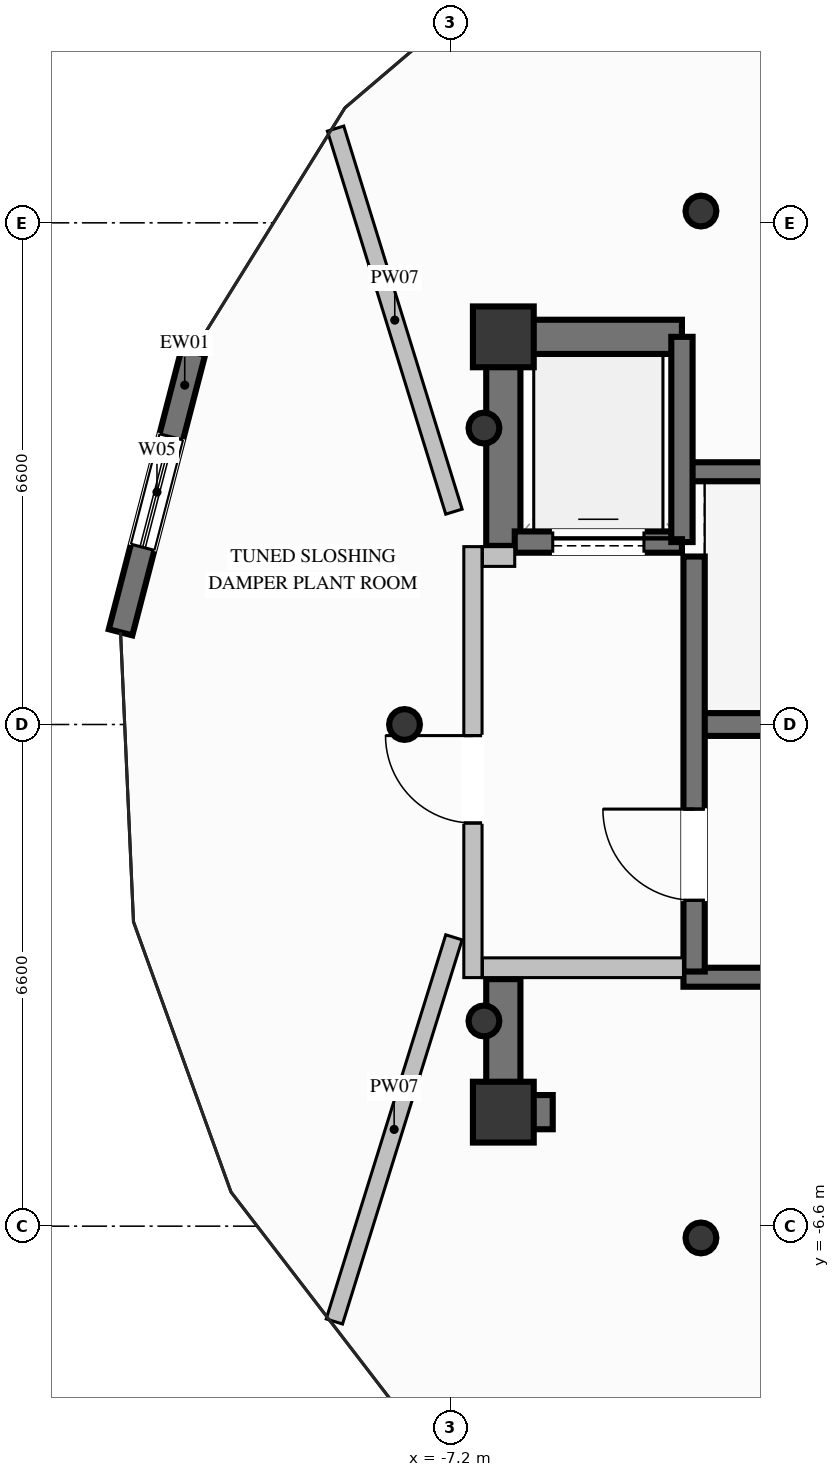
"""IFC4 building model, lengths in metres.
Left out: names, types, materials, properties, quantities, classifications, styles, units other than length and angle.
Written with IfcOpenShell. Run it as: python <this file> out.ifc"""

import sys

from ifc_helpers import new_model, si_unit, direction, frame, frame_2d, origin, origin_2d, place, context, subcontext, project, spatial, rectangle, hollow_circle, extrude, element, fill, save


model = new_model("IFC4")
c1 = context("Model", 3, precision=1e-05, world=origin(), true_north=direction((0.0, 1.0)))
c2 = subcontext(c1, "Body", "Model", "MODEL_VIEW")
j1 = project(units=[si_unit("LENGTHUNIT", "METRE"), si_unit("PLANEANGLEUNIT", "RADIAN")], contexts=[c1])
p1 = place(None, origin())
s1 = spatial("IfcSite", under=j1, at=p1, CompositionType="ELEMENT")
p2 = place(p1, origin())
s2 = spatial("IfcBuilding", under=s1, at=p2, CompositionType="ELEMENT")
p3 = place(p2, frame((0.0, 0.0, 314.6)))
s3 = spatial("IfcBuildingStorey", under=s2, at=p3, CompositionType="ELEMENT", Elevation=314.6)
for number, where, z_axis, x_axis in (
    (1, (-6.5, -5.1, 0.0), (0.0, 0.0, 1.0), (1.0, 0.0, 0.0)),
    (2, (-6.5, 5.1, 0.0), (0.0, 0.0, 1.0), (1.0, 0.0, 0.0)),
):
    element("IfcColumn", number, at=place(p3, frame(where, z_axis=z_axis, x_axis=x_axis)), inside=s3, PredefinedType="COLUMN", context=c2, shape_type="SweptSolid", body=[
        extrude(rectangle(XDim=0.8, YDim=0.8, at=origin_2d()), origin(), (0.0, 0.0, 1.0), 6.4),
    ])
p4 = place(p3, frame((-3.99, 0.0, 0.0), z_axis=(0.0, 0.0, 1.0), x_axis=(1.0, 0.0, 0.0)))
e3 = element("IfcWall", 3, at=p4, inside=s3, PredefinedType="SHEAR", context=c2, shape_type="SweptSolid", body=[
    extrude(rectangle(XDim=7.98, YDim=0.3, at=frame_2d((3.99, 0.0))), origin(), (0.0, 0.0, 1.0), 6.4),
])
for number, where, z_axis, x_axis in (
    (4, (-4.13, -3.325, 0.0), (0.0, 0.0, 1.0), (1.0, 0.0, 0.0)),
    (5, (-4.13, 3.325, 0.0), (0.0, 0.0, 1.0), (1.0, 0.0, 0.0)),
):
    element("IfcWall", number, at=place(p3, frame(where, z_axis=z_axis, x_axis=x_axis)), inside=s3, PredefinedType="SOLIDWALL", context=c2, shape_type="SweptSolid", body=[
        extrude(rectangle(XDim=8.26, YDim=0.25, at=frame_2d((4.13, 0.0))), origin(), (0.0, 0.0, 1.0), 6.4),
    ])
p5 = place(p3, frame((-6.275, -5.1, 0.0), z_axis=(0.0, 0.0, 1.0), x_axis=(1.0, 0.0, 0.0)))
e6 = element("IfcWall", 6, at=p5, inside=s3, PredefinedType="SHEAR", context=c2, shape_type="SweptSolid", body=[
    extrude(rectangle(XDim=0.425, YDim=0.45, at=frame_2d((0.212, 0.0))), origin(), (0.0, 0.0, 1.0), 6.4),
])
p6 = place(p3, frame((-6.275, 5.1, 0.0), z_axis=(0.0, 0.0, 1.0), x_axis=(1.0, 0.0, 0.0)))
e7 = element("IfcWall", 7, at=p6, inside=s3, PredefinedType="SHEAR", context=c2, shape_type="SweptSolid", body=[
    extrude(rectangle(XDim=2.125, YDim=0.45, at=frame_2d((1.062, 0.0))), origin(), (0.0, 0.0, 1.0), 6.4),
])
p7 = place(p3, frame((-6.5, 2.35, 0.0), z_axis=(0.0, 0.0, 1.0), x_axis=(0.0, 1.0, 0.0)))
e8 = element("IfcWall", 8, at=p7, inside=s3, PredefinedType="SHEAR", context=c2, shape_type="SweptSolid", body=[
    extrude(rectangle(XDim=2.975, YDim=0.45, at=frame_2d((1.487, 0.0))), origin(), (0.0, 0.0, 1.0), 6.4),
])
p8 = place(p3, frame((-6.5, -5.325, 0.0), z_axis=(0.0, 0.0, 1.0), x_axis=(0.0, 1.0, 0.0)))
e9 = element("IfcWall", 9, at=p8, inside=s3, PredefinedType="SHEAR", context=c2, shape_type="SweptSolid", body=[
    extrude(rectangle(XDim=1.975, YDim=0.45, at=frame_2d((0.987, 0.0))), origin(), (0.0, 0.0, 1.0), 6.4),
])
for number, where, z_axis, x_axis in (
    (10, (-3.9, 6.755, 0.0), (0.0, 0.0, 1.0), (1.0, 0.0, 0.0)),
    (11, (-6.755, 3.9, 0.0), (0.0, 0.0, 1.0), (1.0, 0.0, 0.0)),
    (12, (-7.8, 0.0, 0.0), (0.0, 0.0, 1.0), (1.0, 0.0, 0.0)),
    (13, (-6.755, -3.9, 0.0), (0.0, 0.0, 1.0), (1.0, 0.0, 0.0)),
    (14, (-3.9, -6.755, 0.0), (0.0, 0.0, 1.0), (1.0, 0.0, 0.0)),
):
    element("IfcColumn", number, at=place(p3, frame(where, z_axis=z_axis, x_axis=x_axis)), inside=s3, PredefinedType="COLUMN", context=c2, shape_type="SweptSolid", body=[
        extrude(hollow_circle(Radius=0.203, WallThickness=0.016, at=origin_2d()), origin(), (0.0, 0.0, 1.0), 6.4),
    ])
p9 = place(p3, frame((-11.536, 1.213, 0.0), z_axis=(0.0, 0.0, 1.0), x_axis=(0.2512799417, 0.967914454329, 0.0)))
e15 = element("IfcWall", 15, at=p9, inside=s3, PredefinedType="SOLIDWALL", context=c2, shape_type="SweptSolid", body=[
    extrude(rectangle(XDim=3.812, YDim=0.32, at=frame_2d((1.906, 0.0))), origin(), (0.0, 0.0, 1.0), 6.12),
])
p10 = place(p9, frame((1.156, 0.0, 1.1)))
e16 = element("IfcOpeningElement", 16, at=p10, cuts=e15, PredefinedType="OPENING", context=c2, shape_type="SweptSolid", body=[
    extrude(rectangle(XDim=1.5, YDim=1.2, at=frame_2d((0.75, 0.6))), frame((0.0, 0.17, 0.0), z_axis=(0.0, -1.0, 0.0), x_axis=(1.0, 0.0, 0.0)), (0.0, 0.0, 1.0), 0.34),
])
p11 = place(p3, frame((-6.35, 2.4, 0.0), z_axis=(0.0, 0.0, 1.0), x_axis=(1.0, 0.0, 0.0)))
e17 = element("IfcWall", 17, at=p11, inside=s3, PredefinedType="SOLIDWALL", context=c2, shape_type="SweptSolid", body=[
    extrude(rectangle(XDim=2.2, YDim=0.28, at=frame_2d((1.1, 0.0))), origin(), (0.0, 0.0, 1.0), 6.12),
])
p12 = place(p11, frame((0.5, 0.0, 0.0)))
e18 = element("IfcOpeningElement", 18, at=p12, cuts=e17, PredefinedType="OPENING", context=c2, shape_type="SweptSolid", body=[
    extrude(rectangle(XDim=1.2, YDim=2.2, at=frame_2d((0.6, 1.1))), frame((0.0, 0.15, 0.0), z_axis=(0.0, -1.0, 0.0), x_axis=(1.0, 0.0, 0.0)), (0.0, 0.0, 1.0), 0.3),
])
p13 = place(p3, frame((-4.15, 2.4, 0.0), z_axis=(0.0, 0.0, 1.0), x_axis=(0.0, 1.0, 0.0)))
e19 = element("IfcWall", 19, at=p13, inside=s3, PredefinedType="SOLIDWALL", context=c2, shape_type="SweptSolid", body=[
    extrude(rectangle(XDim=2.7, YDim=0.28, at=frame_2d((1.35, 0.0))), origin(), (0.0, 0.0, 1.0), 6.12),
])
p14 = place(p3, frame((-3.99, -3.25, 0.0), z_axis=(0.0, 0.0, 1.0), x_axis=(0.0, 1.0, 0.0)))
e20 = element("IfcWall", 20, at=p14, inside=s3, PredefinedType="SOLIDWALL", context=c2, shape_type="SweptSolid", body=[
    extrude(rectangle(XDim=5.46, YDim=0.28, at=frame_2d((2.73, 0.0))), origin(), (0.0, 0.0, 1.0), 6.12),
])
p15 = place(p14, frame((0.937, 0.0, 0.0)))
e21 = element("IfcOpeningElement", 21, at=p15, cuts=e20, PredefinedType="OPENING", context=c2, shape_type="SweptSolid", body=[
    extrude(rectangle(XDim=1.2, YDim=2.2, at=frame_2d((0.6, 1.1))), frame((0.0, 0.15, 0.0), z_axis=(0.0, -1.0, 0.0), x_axis=(1.0, 0.0, 0.0)), (0.0, 0.0, 1.0), 0.3),
])
p16 = place(p3, frame((-6.9, -3.33, 0.0), z_axis=(0.0, 0.0, 1.0), x_axis=(0.0, 1.0, 0.0)))
e22 = element("IfcWall", 22, at=p16, inside=s3, PredefinedType="PARTITIONING", context=c2, shape_type="SweptSolid", body=[
    extrude(rectangle(XDim=5.67, YDim=0.24, at=frame_2d((2.835, 0.0))), origin(), (0.0, 0.0, 1.0), 5.005),
])
p17 = place(p16, frame((2.034, 0.0, 0.0)))
e23 = element("IfcOpeningElement", 23, at=p17, cuts=e22, PredefinedType="OPENING", context=c2, shape_type="SweptSolid", body=[
    extrude(rectangle(XDim=1.15, YDim=2.2, at=frame_2d((0.575, 1.1))), frame((0.0, 0.13, 0.0), z_axis=(0.0, -1.0, 0.0), x_axis=(1.0, 0.0, 0.0)), (0.0, 0.0, 1.0), 0.26),
])
p18 = place(p3, frame((-6.775, -3.2, 0.0), z_axis=(0.0, 0.0, 1.0), x_axis=(1.0, 0.0, 0.0)))
e24 = element("IfcWall", 24, at=p18, inside=s3, PredefinedType="PARTITIONING", context=c2, shape_type="SweptSolid", body=[
    extrude(rectangle(XDim=2.645, YDim=0.26, at=frame_2d((1.323, 0.0))), origin(), (0.0, 0.0, 1.0), 6.12),
])
p19 = place(p3, frame((-6.775, 2.21, 0.0), z_axis=(0.0, 0.0, 1.0), x_axis=(1.0, 0.0, 0.0)))
e25 = element("IfcWall", 25, at=p19, inside=s3, PredefinedType="PARTITIONING", context=c2, shape_type="SweptSolid", body=[
    extrude(rectangle(XDim=0.425, YDim=0.26, at=frame_2d((0.212, 0.0))), origin(), (0.0, 0.0, 1.0), 6.12),
])
p20 = place(p3, frame((-7.15, 2.8, 0.0), z_axis=(0.0, 0.0, 1.0), x_axis=(-0.295184908093, 0.955440144663, 0.0)))
e26 = element("IfcWall", 26, at=p20, inside=s3, PredefinedType="PARTITIONING", context=c2, shape_type="SweptSolid", body=[
    extrude(rectangle(XDim=5.275, YDim=0.225, at=frame_2d((2.638, 0.0))), origin(), (0.0, 0.0, 1.0), 5.005),
])
p21 = place(p3, frame((-7.15, -2.8, 0.0), z_axis=(0.0, 0.0, 1.0), x_axis=(-0.297179629103, -0.954821589642, 0.0)))
e27 = element("IfcWall", 27, at=p21, inside=s3, PredefinedType="PARTITIONING", context=c2, shape_type="SweptSolid", body=[
    extrude(rectangle(XDim=5.293, YDim=0.225, at=frame_2d((2.646, 0.0))), origin(), (0.0, 0.0, 1.0), 5.005),
])
p22 = place(p10, origin())
e28 = element("IfcWindow", 28, at=p22, inside=s3, PartitioningType="SINGLE_PANEL", PredefinedType="WINDOW", context=c2, shape_type="SweptSolid", body=[
    extrude(rectangle(XDim=1.5, YDim=1.2, at=frame_2d((0.75, 0.6))), frame((0.0, 0.03, 0.0), z_axis=(0.0, -1.0, 0.0), x_axis=(1.0, 0.0, 0.0)), (0.0, 0.0, 1.0), 0.06),
])
fill(e16, e28)
p23 = place(p12, origin())
e29 = element("IfcDoor", 29, at=p23, inside=s3, OperationType="SLIDING_TO_LEFT", PredefinedType="DOOR", context=c2, shape_type="SweptSolid", body=[
    extrude(rectangle(XDim=1.2, YDim=2.2, at=frame_2d((0.6, 1.1))), frame((0.0, 0.025, 0.0), z_axis=(0.0, -1.0, 0.0), x_axis=(1.0, 0.0, 0.0)), (0.0, 0.0, 1.0), 0.05),
])
fill(e18, e29)
p24 = place(p15, origin())
e30 = element("IfcDoor", 30, at=p24, inside=s3, OperationType="SINGLE_SWING_RIGHT", PredefinedType="DOOR", context=c2, shape_type="SweptSolid", body=[
    extrude(rectangle(XDim=1.2, YDim=2.2, at=frame_2d((0.6, 1.1))), frame((0.0, 0.025, 0.0), z_axis=(0.0, -1.0, 0.0), x_axis=(1.0, 0.0, 0.0)), (0.0, 0.0, 1.0), 0.05),
])
fill(e21, e30)
p25 = place(p17, origin())
e31 = element("IfcDoor", 31, at=p25, inside=s3, OperationType="SINGLE_SWING_RIGHT", PredefinedType="DOOR", context=c2, shape_type="SweptSolid", body=[
    extrude(rectangle(XDim=1.15, YDim=2.2, at=frame_2d((0.575, 1.1))), frame((0.0, 0.025, 0.0), z_axis=(0.0, -1.0, 0.0), x_axis=(1.0, 0.0, 0.0)), (0.0, 0.0, 1.0), 0.05),
])
fill(e23, e31)
save(model, sys.argv[1])
